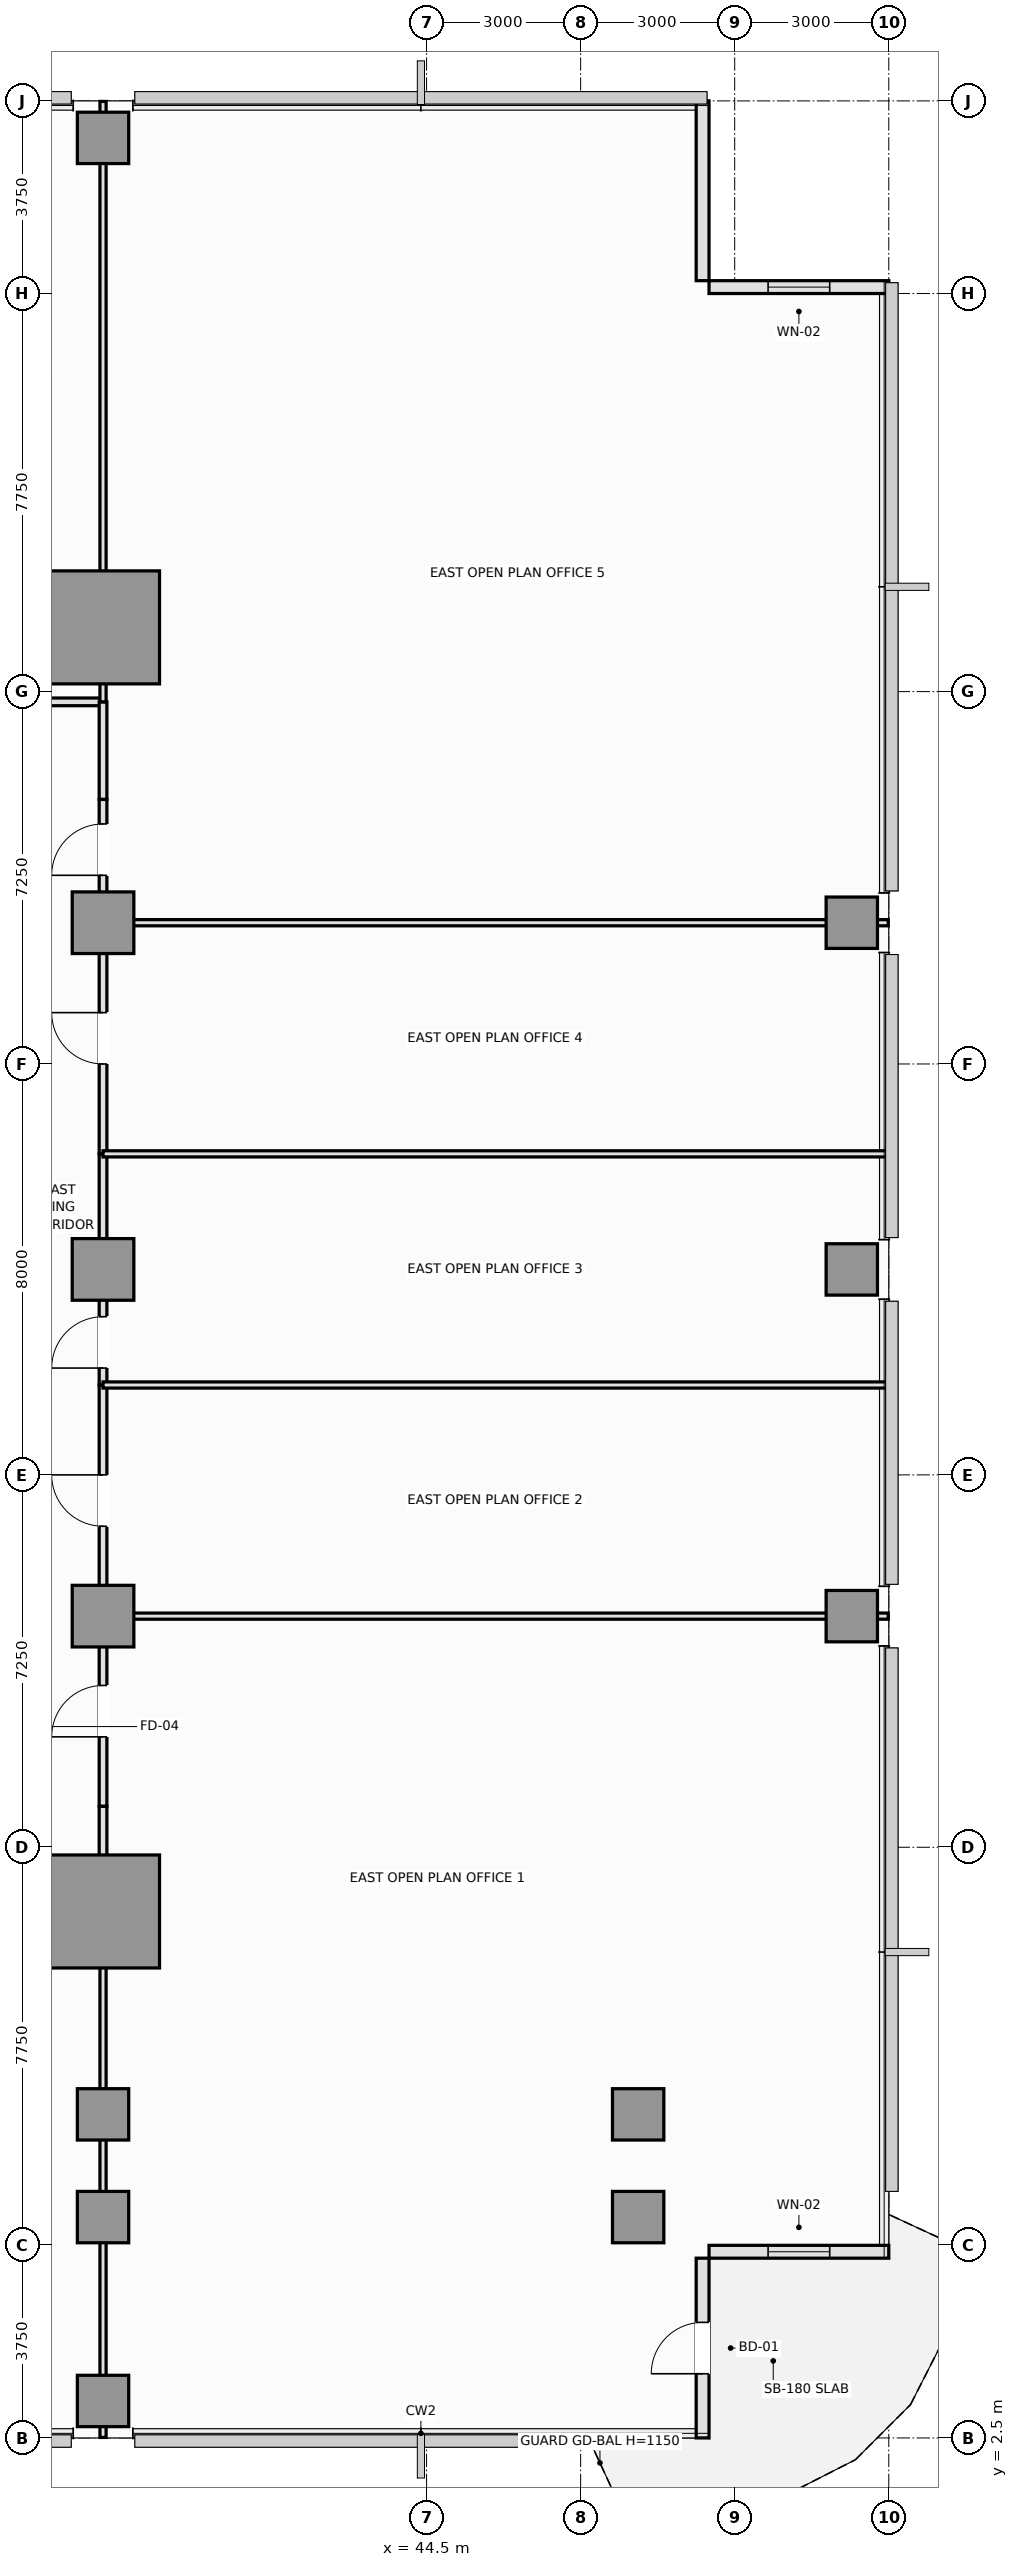
"""IFC4 building model, lengths in metres.
Left out: names, types, materials, properties, quantities, classifications, styles, units other than length and angle.
Written with IfcOpenShell. Run it as: python <this file> out.ifc"""

import sys

from ifc_helpers import new_model, si_unit, direction, frame, frame_2d, origin, origin_2d, place, context, subcontext, project, spatial, rectangle, extrude, element, fill, save


model = new_model("IFC4")
c1 = context("Model", 3, precision=1e-05, world=origin(), true_north=direction((0.0, 1.0)))
c2 = subcontext(c1, "Body", "Model", "MODEL_VIEW")
j1 = project(units=[si_unit("LENGTHUNIT", "METRE"), si_unit("PLANEANGLEUNIT", "RADIAN")], contexts=[c1])
p1 = place(None, origin())
s1 = spatial("IfcSite", under=j1, at=p1, CompositionType="ELEMENT")
p2 = place(p1, origin())
s2 = spatial("IfcBuilding", under=s1, at=p2, CompositionType="ELEMENT")
p3 = place(p2, frame((0.0, 0.0, 82.4)))
s3 = spatial("IfcBuildingStorey", under=s2, at=p3, CompositionType="ELEMENT", Elevation=82.4)
for number, where, z_axis, x_axis in (
    (1, (38.2, 12.75, 0.0), (0.0, 0.0, 1.0), (1.0, 0.0, 0.0)),
    (2, (38.2, 37.75, 0.0), (0.0, 0.0, 1.0), (1.0, 0.0, 0.0)),
):
    element("IfcColumn", number, at=place(p3, frame(where, z_axis=z_axis, x_axis=x_axis)), inside=s3, PredefinedType="COLUMN", context=c2, shape_type="SweptSolid", body=[
        extrude(rectangle(XDim=2.2, YDim=2.2, at=origin_2d()), origin(), (0.0, 0.0, 1.0), 3.55),
    ])
for number, where, z_axis, x_axis in (
    (3, (38.2, 18.5, 0.0), (0.0, 0.0, 1.0), (1.0, 0.0, 0.0)),
    (4, (38.2, 25.25, 0.0), (0.0, 0.0, 1.0), (1.0, 0.0, 0.0)),
    (5, (38.2, 32.0, 0.0), (0.0, 0.0, 1.0), (1.0, 0.0, 0.0)),
):
    element("IfcColumn", number, at=place(p3, frame(where, z_axis=z_axis, x_axis=x_axis)), inside=s3, PredefinedType="COLUMN", context=c2, shape_type="SweptSolid", body=[
        extrude(rectangle(XDim=1.2, YDim=1.2, at=origin_2d()), origin(), (0.0, 0.0, 1.0), 3.55),
    ])
for number, where, z_axis, x_axis in (
    (6, (48.62, 6.8, 0.0), (0.0, 0.0, 1.0), (1.0, 0.0, 0.0)),
    (7, (38.2, 6.8, 0.0), (0.0, 0.0, 1.0), (1.0, 0.0, 0.0)),
    (8, (38.2, 8.8, 0.0), (0.0, 0.0, 1.0), (1.0, 0.0, 0.0)),
    (9, (48.62, 8.8, 0.0), (0.0, 0.0, 1.0), (1.0, 0.0, 0.0)),
    (10, (52.78, 18.5, 0.0), (0.0, 0.0, 1.0), (1.0, 0.0, 0.0)),
    (11, (52.78, 25.25, 0.0), (0.0, 0.0, 1.0), (1.0, 0.0, 0.0)),
    (12, (52.78, 32.0, 0.0), (0.0, 0.0, 1.0), (1.0, 0.0, 0.0)),
    (13, (38.2, 3.22, 0.0), (0.0, 0.0, 1.0), (1.0, 0.0, 0.0)),
    (14, (38.2, 47.28, 0.0), (0.0, 0.0, 1.0), (1.0, 0.0, 0.0)),
):
    element("IfcColumn", number, at=place(p3, frame(where, z_axis=z_axis, x_axis=x_axis)), inside=s3, PredefinedType="COLUMN", context=c2, shape_type="SweptSolid", body=[
        extrude(rectangle(XDim=1.0, YDim=1.0, at=origin_2d()), origin(), (0.0, 0.0, 1.0), 3.55),
    ])
p4 = place(p3, frame((49.875, 2.5, 0.0), z_axis=(0.0, 0.0, 1.0), x_axis=(0.0, 1.0, 0.0)))
e15 = element("IfcWall", 15, at=p4, inside=s3, PredefinedType="SOLIDWALL", context=c2, shape_type="SweptSolid", body=[
    extrude(rectangle(XDim=3.5, YDim=0.25, at=frame_2d((1.75, 0.0))), origin(), (0.0, 0.0, 1.0), 3.07),
])
p5 = place(p4, frame((1.25, 0.0, 0.0)))
e16 = element("IfcOpeningElement", 16, at=p5, cuts=e15, PredefinedType="OPENING", context=c2, shape_type="SweptSolid", body=[
    extrude(rectangle(XDim=1.0, YDim=2.2, at=frame_2d((0.5, 1.1))), frame((0.0, 0.135, 0.0), z_axis=(0.0, -1.0, 0.0), x_axis=(1.0, 0.0, 0.0)), (0.0, 0.0, 1.0), 0.27),
])
p6 = place(p3, frame((50.0, 6.125, 0.0), z_axis=(0.0, 0.0, 1.0), x_axis=(1.0, 0.0, 0.0)))
e17 = element("IfcWall", 17, at=p6, inside=s3, PredefinedType="SOLIDWALL", context=c2, shape_type="SweptSolid", body=[
    extrude(rectangle(XDim=3.5, YDim=0.25, at=frame_2d((1.75, 0.0))), origin(), (0.0, 0.0, 1.0), 3.07),
])
p7 = place(p6, frame((1.15, 0.0, 0.9)))
e18 = element("IfcOpeningElement", 18, at=p7, cuts=e17, PredefinedType="OPENING", context=c2, shape_type="SweptSolid", body=[
    extrude(rectangle(XDim=1.2, YDim=1.8, at=frame_2d((0.6, 0.9))), frame((0.0, 0.135, 0.0), z_axis=(0.0, -1.0, 0.0), x_axis=(1.0, 0.0, 0.0)), (0.0, 0.0, 1.0), 0.27),
])
p8 = place(p3, frame((53.5, 44.375, 0.0), z_axis=(0.0, 0.0, 1.0), x_axis=(-1.0, 0.0, 0.0)))
e19 = element("IfcWall", 19, at=p8, inside=s3, PredefinedType="SOLIDWALL", context=c2, shape_type="SweptSolid", body=[
    extrude(rectangle(XDim=3.5, YDim=0.25, at=frame_2d((1.75, 0.0))), origin(), (0.0, 0.0, 1.0), 3.37),
])
p9 = place(p8, frame((1.15, 0.0, 0.9)))
e20 = element("IfcOpeningElement", 20, at=p9, cuts=e19, PredefinedType="OPENING", context=c2, shape_type="SweptSolid", body=[
    extrude(rectangle(XDim=1.2, YDim=1.8, at=frame_2d((0.6, 0.9))), frame((0.0, 0.135, 0.0), z_axis=(0.0, -1.0, 0.0), x_axis=(1.0, 0.0, 0.0)), (0.0, 0.0, 1.0), 0.27),
])
p10 = place(p3, frame((49.875, 44.5, 0.0), z_axis=(0.0, 0.0, 1.0), x_axis=(0.0, 1.0, 0.0)))
e21 = element("IfcWall", 21, at=p10, inside=s3, PredefinedType="SOLIDWALL", context=c2, shape_type="SweptSolid", body=[
    extrude(rectangle(XDim=3.5, YDim=0.25, at=frame_2d((1.75, 0.0))), origin(), (0.0, 0.0, 1.0), 3.37),
])
p11 = place(p3, frame((30.8, 12.9, 0.0), z_axis=(0.0, 0.0, 1.0), x_axis=(1.0, 0.0, 0.0)))
e22 = element("IfcWall", 22, at=p11, inside=s3, PredefinedType="PARTITIONING", context=c2, shape_type="SweptSolid", body=[
    extrude(rectangle(XDim=7.4, YDim=0.15, at=frame_2d((3.7, 0.0))), origin(), (0.0, 0.0, 1.0), 2.72),
])
p12 = place(p11, frame((3.2, 0.0, 0.0)))
e23 = element("IfcOpeningElement", 23, at=p12, cuts=e22, PredefinedType="OPENING", context=c2, shape_type="SweptSolid", body=[
    extrude(rectangle(XDim=1.0, YDim=2.15, at=frame_2d((0.5, 1.075))), frame((0.0, 0.085, 0.0), z_axis=(0.0, -1.0, 0.0), x_axis=(1.0, 0.0, 0.0)), (0.0, 0.0, 1.0), 0.17),
])
p13 = place(p3, frame((38.2, 12.9, 0.0), z_axis=(0.0, 0.0, 1.0), x_axis=(0.0, 1.0, 0.0)))
e24 = element("IfcWall", 24, at=p13, inside=s3, PredefinedType="PARTITIONING", context=c2, shape_type="SweptSolid", body=[
    extrude(rectangle(XDim=1.9, YDim=0.15, at=frame_2d((0.95, 0.0))), origin(), (0.0, 0.0, 1.0), 2.82),
])
p14 = place(p3, frame((34.6, 36.3, 0.0), z_axis=(0.0, 0.0, 1.0), x_axis=(1.0, 0.0, 0.0)))
e25 = element("IfcWall", 25, at=p14, inside=s3, PredefinedType="PARTITIONING", context=c2, shape_type="SweptSolid", body=[
    extrude(rectangle(XDim=3.6, YDim=0.15, at=frame_2d((1.8, 0.0))), origin(), (0.0, 0.0, 1.0), 3.37),
])
p15 = place(p14, frame((1.225, 0.0, 0.0)))
e26 = element("IfcOpeningElement", 26, at=p15, cuts=e25, PredefinedType="OPENING", context=c2, shape_type="SweptSolid", body=[
    extrude(rectangle(XDim=1.0, YDim=2.15, at=frame_2d((0.5, 1.075))), frame((0.0, 0.085, 0.0), z_axis=(0.0, -1.0, 0.0), x_axis=(1.0, 0.0, 0.0)), (0.0, 0.0, 1.0), 0.17),
])
p16 = place(p3, frame((38.2, 34.4, 0.0), z_axis=(0.0, 0.0, 1.0), x_axis=(0.0, 1.0, 0.0)))
e27 = element("IfcWall", 27, at=p16, inside=s3, PredefinedType="PARTITIONING", context=c2, shape_type="SweptSolid", body=[
    extrude(rectangle(XDim=1.9, YDim=0.15, at=frame_2d((0.95, 0.0))), origin(), (0.0, 0.0, 1.0), 2.82),
])
p17 = place(p3, frame((38.2, 14.8, 0.0), z_axis=(0.0, 0.0, 1.0), x_axis=(0.0, 1.0, 0.0)))
e28 = element("IfcWall", 28, at=p17, inside=s3, PredefinedType="PARTITIONING", context=c2, shape_type="SweptSolid", body=[
    extrude(rectangle(XDim=3.7, YDim=0.15, at=frame_2d((1.85, 0.0))), origin(), (0.0, 0.0, 1.0), 2.82),
])
p18 = place(p17, frame((1.35, 0.0, 0.0)))
e29 = element("IfcOpeningElement", 29, at=p18, cuts=e28, PredefinedType="OPENING", context=c2, shape_type="SweptSolid", body=[
    extrude(rectangle(XDim=1.0, YDim=2.15, at=frame_2d((0.5, 1.075))), frame((0.0, 0.085, 0.0), z_axis=(0.0, -1.0, 0.0), x_axis=(1.0, 0.0, 0.0)), (0.0, 0.0, 1.0), 0.17),
])
p19 = place(p3, frame((38.2, 18.5, 0.0), z_axis=(0.0, 0.0, 1.0), x_axis=(0.0, 1.0, 0.0)))
e30 = element("IfcWall", 30, at=p19, inside=s3, PredefinedType="PARTITIONING", context=c2, shape_type="SweptSolid", body=[
    extrude(rectangle(XDim=4.5, YDim=0.15, at=frame_2d((2.25, 0.0))), origin(), (0.0, 0.0, 1.0), 2.82),
])
p20 = place(p19, frame((1.75, 0.0, 0.0)))
e31 = element("IfcOpeningElement", 31, at=p20, cuts=e30, PredefinedType="OPENING", context=c2, shape_type="SweptSolid", body=[
    extrude(rectangle(XDim=1.0, YDim=2.15, at=frame_2d((0.5, 1.075))), frame((0.0, 0.085, 0.0), z_axis=(0.0, -1.0, 0.0), x_axis=(1.0, 0.0, 0.0)), (0.0, 0.0, 1.0), 0.17),
])
p21 = place(p3, frame((38.2, 23.0, 0.0), z_axis=(0.0, 0.0, 1.0), x_axis=(0.0, 1.0, 0.0)))
e32 = element("IfcWall", 32, at=p21, inside=s3, PredefinedType="PARTITIONING", context=c2, shape_type="SweptSolid", body=[
    extrude(rectangle(XDim=4.5, YDim=0.15, at=frame_2d((2.25, 0.0))), origin(), (0.0, 0.0, 1.0), 2.82),
])
p22 = place(p21, frame((0.33, 0.0, 0.0)))
e33 = element("IfcOpeningElement", 33, at=p22, cuts=e32, PredefinedType="OPENING", context=c2, shape_type="SweptSolid", body=[
    extrude(rectangle(XDim=1.0, YDim=2.15, at=frame_2d((0.5, 1.075))), frame((0.0, 0.085, 0.0), z_axis=(0.0, -1.0, 0.0), x_axis=(1.0, 0.0, 0.0)), (0.0, 0.0, 1.0), 0.17),
])
p23 = place(p3, frame((38.2, 27.5, 0.0), z_axis=(0.0, 0.0, 1.0), x_axis=(0.0, 1.0, 0.0)))
e34 = element("IfcWall", 34, at=p23, inside=s3, PredefinedType="PARTITIONING", context=c2, shape_type="SweptSolid", body=[
    extrude(rectangle(XDim=4.5, YDim=0.15, at=frame_2d((2.25, 0.0))), origin(), (0.0, 0.0, 1.0), 2.82),
])
p24 = place(p23, frame((1.75, 0.0, 0.0)))
e35 = element("IfcOpeningElement", 35, at=p24, cuts=e34, PredefinedType="OPENING", context=c2, shape_type="SweptSolid", body=[
    extrude(rectangle(XDim=1.0, YDim=2.15, at=frame_2d((0.5, 1.075))), frame((0.0, 0.085, 0.0), z_axis=(0.0, -1.0, 0.0), x_axis=(1.0, 0.0, 0.0)), (0.0, 0.0, 1.0), 0.17),
])
p25 = place(p3, frame((38.2, 32.0, 0.0), z_axis=(0.0, 0.0, 1.0), x_axis=(0.0, 1.0, 0.0)))
e36 = element("IfcWall", 36, at=p25, inside=s3, PredefinedType="PARTITIONING", context=c2, shape_type="SweptSolid", body=[
    extrude(rectangle(XDim=2.4, YDim=0.15, at=frame_2d((1.2, 0.0))), origin(), (0.0, 0.0, 1.0), 2.82),
])
p26 = place(p25, frame((0.923, 0.0, 0.0)))
e37 = element("IfcOpeningElement", 37, at=p26, cuts=e36, PredefinedType="OPENING", context=c2, shape_type="SweptSolid", body=[
    extrude(rectangle(XDim=1.0, YDim=2.15, at=frame_2d((0.5, 1.075))), frame((0.0, 0.085, 0.0), z_axis=(0.0, -1.0, 0.0), x_axis=(1.0, 0.0, 0.0)), (0.0, 0.0, 1.0), 0.17),
])
p27 = place(p3, frame((38.2, 2.51, 0.0), z_axis=(0.0, 0.0, 1.0), x_axis=(0.0, 1.0, 0.0)))
e38 = element("IfcWall", 38, at=p27, inside=s3, PredefinedType="PARTITIONING", context=c2, shape_type="SweptSolid", body=[
    extrude(rectangle(XDim=10.39, YDim=0.12, at=frame_2d((5.195, 0.0))), origin(), (0.0, 0.0, 1.0), 2.82),
])
p28 = place(p3, frame((38.2, 36.3, 0.0), z_axis=(0.0, 0.0, 1.0), x_axis=(0.0, 1.0, 0.0)))
e39 = element("IfcWall", 39, at=p28, inside=s3, PredefinedType="PARTITIONING", context=c2, shape_type="SweptSolid", body=[
    extrude(rectangle(XDim=11.69, YDim=0.12, at=frame_2d((5.845, 0.0))), origin(), (0.0, 0.0, 1.0), 2.82),
])
p29 = place(p3, frame((38.2, 18.5, 0.0), z_axis=(0.0, 0.0, 1.0), x_axis=(1.0, 0.0, 0.0)))
e40 = element("IfcWall", 40, at=p29, inside=s3, PredefinedType="PARTITIONING", context=c2, shape_type="SweptSolid", body=[
    extrude(rectangle(XDim=15.29, YDim=0.12, at=frame_2d((7.645, 0.0))), origin(), (0.0, 0.0, 1.0), 2.72),
])
for number, where, z_axis, x_axis in (
    (41, (38.2, 23.0, 0.0), (0.0, 0.0, 1.0), (1.0, 0.0, 0.0)),
    (42, (38.2, 27.5, 0.0), (0.0, 0.0, 1.0), (1.0, 0.0, 0.0)),
):
    element("IfcWall", number, at=place(p3, frame(where, z_axis=z_axis, x_axis=x_axis)), inside=s3, PredefinedType="PARTITIONING", context=c2, shape_type="SweptSolid", body=[
        extrude(rectangle(XDim=15.29, YDim=0.12, at=frame_2d((7.645, 0.0))), origin(), (0.0, 0.0, 1.0), 3.37),
    ])
p30 = place(p3, frame((38.2, 32.0, 0.0), z_axis=(0.0, 0.0, 1.0), x_axis=(1.0, 0.0, 0.0)))
e43 = element("IfcWall", 43, at=p30, inside=s3, PredefinedType="PARTITIONING", context=c2, shape_type="SweptSolid", body=[
    extrude(rectangle(XDim=15.29, YDim=0.12, at=frame_2d((7.645, 0.0))), origin(), (0.0, 0.0, 1.0), 2.72),
])
p31 = place(p5, frame((1.0, 0.0, 0.0), z_axis=(0.0, 0.0, 1.0), x_axis=(-1.0, 0.0, 0.0)))
e44 = element("IfcDoor", 44, at=p31, inside=s3, OperationType="SINGLE_SWING_LEFT", PredefinedType="DOOR", context=c2, shape_type="SweptSolid", body=[
    extrude(rectangle(XDim=1.0, YDim=2.2, at=frame_2d((0.5, 1.1))), frame((0.0, 0.025, 0.0), z_axis=(0.0, -1.0, 0.0), x_axis=(1.0, 0.0, 0.0)), (0.0, 0.0, 1.0), 0.05),
])
fill(e16, e44)
p32 = place(p7, origin())
e45 = element("IfcWindow", 45, at=p32, inside=s3, PartitioningType="SINGLE_PANEL", PredefinedType="WINDOW", context=c2, shape_type="SweptSolid", body=[
    extrude(rectangle(XDim=1.2, YDim=1.8, at=frame_2d((0.6, 0.9))), frame((0.0, 0.03, 0.0), z_axis=(0.0, -1.0, 0.0), x_axis=(1.0, 0.0, 0.0)), (0.0, 0.0, 1.0), 0.06),
])
fill(e18, e45)
p33 = place(p9, origin())
e46 = element("IfcWindow", 46, at=p33, inside=s3, PartitioningType="SINGLE_PANEL", PredefinedType="WINDOW", context=c2, shape_type="SweptSolid", body=[
    extrude(rectangle(XDim=1.2, YDim=1.8, at=frame_2d((0.6, 0.9))), frame((0.0, 0.03, 0.0), z_axis=(0.0, -1.0, 0.0), x_axis=(1.0, 0.0, 0.0)), (0.0, 0.0, 1.0), 0.06),
])
fill(e20, e46)
p34 = place(p18, origin())
e47 = element("IfcDoor", 47, at=p34, inside=s3, OperationType="SINGLE_SWING_LEFT", PredefinedType="DOOR", context=c2, shape_type="SweptSolid", body=[
    extrude(rectangle(XDim=1.0, YDim=2.15, at=frame_2d((0.5, 1.075))), frame((0.0, 0.025, 0.0), z_axis=(0.0, -1.0, 0.0), x_axis=(1.0, 0.0, 0.0)), (0.0, 0.0, 1.0), 0.05),
])
fill(e29, e47)
p35 = place(p20, origin())
e48 = element("IfcDoor", 48, at=p35, inside=s3, OperationType="SINGLE_SWING_RIGHT", PredefinedType="DOOR", context=c2, shape_type="SweptSolid", body=[
    extrude(rectangle(XDim=1.0, YDim=2.15, at=frame_2d((0.5, 1.075))), frame((0.0, 0.025, 0.0), z_axis=(0.0, -1.0, 0.0), x_axis=(1.0, 0.0, 0.0)), (0.0, 0.0, 1.0), 0.05),
])
fill(e31, e48)
p36 = place(p22, origin())
e49 = element("IfcDoor", 49, at=p36, inside=s3, OperationType="SINGLE_SWING_LEFT", PredefinedType="DOOR", context=c2, shape_type="SweptSolid", body=[
    extrude(rectangle(XDim=1.0, YDim=2.15, at=frame_2d((0.5, 1.075))), frame((0.0, 0.025, 0.0), z_axis=(0.0, -1.0, 0.0), x_axis=(1.0, 0.0, 0.0)), (0.0, 0.0, 1.0), 0.05),
])
fill(e33, e49)
p37 = place(p24, origin())
e50 = element("IfcDoor", 50, at=p37, inside=s3, OperationType="SINGLE_SWING_RIGHT", PredefinedType="DOOR", context=c2, shape_type="SweptSolid", body=[
    extrude(rectangle(XDim=1.0, YDim=2.15, at=frame_2d((0.5, 1.075))), frame((0.0, 0.025, 0.0), z_axis=(0.0, -1.0, 0.0), x_axis=(1.0, 0.0, 0.0)), (0.0, 0.0, 1.0), 0.05),
])
fill(e35, e50)
p38 = place(p26, origin())
e51 = element("IfcDoor", 51, at=p38, inside=s3, OperationType="SINGLE_SWING_LEFT", PredefinedType="DOOR", context=c2, shape_type="SweptSolid", body=[
    extrude(rectangle(XDim=1.0, YDim=2.15, at=frame_2d((0.5, 1.075))), frame((0.0, 0.025, 0.0), z_axis=(0.0, -1.0, 0.0), x_axis=(1.0, 0.0, 0.0)), (0.0, 0.0, 1.0), 0.05),
])
fill(e37, e51)
save(model, sys.argv[1])
